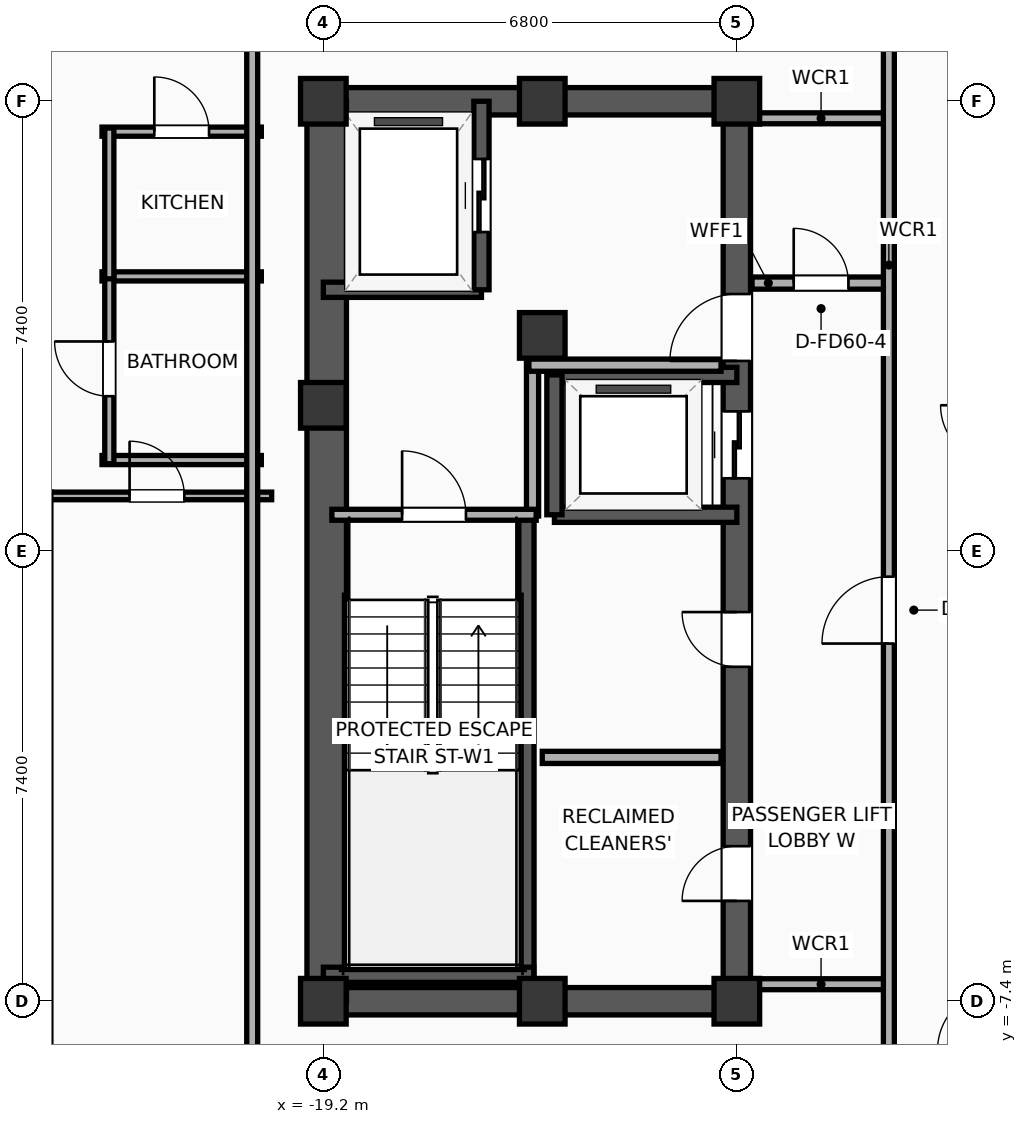
"""IFC4 building model, lengths in metres.
Left out: names, types, materials, properties, quantities, classifications, styles, units other than length and angle.
Written with IfcOpenShell. Run it as: python <this file> out.ifc"""

import sys

from ifc_helpers import new_model, si_unit, direction, frame, frame_2d, origin, origin_2d, place, context, subcontext, project, spatial, rectangle, extrude, element, fill, save


model = new_model("IFC4")
c1 = context("Model", 3, precision=1e-05, world=origin(), true_north=direction((0.0, 1.0)))
c2 = subcontext(c1, "Body", "Model", "MODEL_VIEW")
j1 = project(units=[si_unit("LENGTHUNIT", "METRE"), si_unit("PLANEANGLEUNIT", "RADIAN")], contexts=[c1])
p1 = place(None, origin())
s1 = spatial("IfcSite", under=j1, at=p1, CompositionType="ELEMENT")
p2 = place(p1, origin())
s2 = spatial("IfcBuilding", under=s1, at=p2, CompositionType="ELEMENT")
p3 = place(p2, frame((0.0, 0.0, 287.3)))
s3 = spatial("IfcBuildingStorey", under=s2, at=p3, CompositionType="ELEMENT", Elevation=287.3)
for number, where, z_axis, x_axis in (
    (1, (-19.2, -7.4, 0.0), (0.0, 0.0, 1.0), (1.0, 0.0, 0.0)),
    (2, (-19.2, 2.4, 0.0), (0.0, 0.0, 1.0), (1.0, 0.0, 0.0)),
    (3, (-19.2, 7.4, 0.0), (0.0, 0.0, 1.0), (1.0, 0.0, 0.0)),
    (4, (-15.6, -7.4, 0.0), (0.0, 0.0, 1.0), (1.0, 0.0, 0.0)),
    (5, (-15.6, 7.4, 0.0), (0.0, 0.0, 1.0), (1.0, 0.0, 0.0)),
    (6, (-12.4, -7.4, 0.0), (0.0, 0.0, 1.0), (1.0, 0.0, 0.0)),
    (7, (-15.6, 3.55, 0.0), (0.0, 0.0, 1.0), (1.0, 0.0, 0.0)),
    (8, (-12.4, 7.4, 0.0), (0.0, 0.0, 1.0), (1.0, 0.0, 0.0)),
):
    element("IfcColumn", number, at=place(p3, frame(where, z_axis=z_axis, x_axis=x_axis)), inside=s3, PredefinedType="COLUMN", context=c2, shape_type="SweptSolid", body=[
        extrude(rectangle(XDim=0.75, YDim=0.75, at=origin_2d()), origin(), (0.0, 0.0, 1.0), 3.9),
    ])
for number, where, z_axis, x_axis in (
    (9, (-19.425, -7.4, 0.0), (0.0, 0.0, 1.0), (1.0, 0.0, 0.0)),
    (10, (-19.425, 7.4, 0.0), (0.0, 0.0, 1.0), (1.0, 0.0, 0.0)),
):
    element("IfcWall", number, at=place(p3, frame(where, z_axis=z_axis, x_axis=x_axis)), inside=s3, PredefinedType="SHEAR", context=c2, shape_type="SweptSolid", body=[
        extrude(rectangle(XDim=7.25, YDim=0.45, at=frame_2d((3.625, 0.0))), origin(), (0.0, 0.0, 1.0), 3.635),
    ])
p4 = place(p3, frame((-19.145, -7.4, 0.0), z_axis=(0.0, 0.0, 1.0), x_axis=(0.0, 1.0, 0.0)))
e11 = element("IfcWall", 11, at=p4, inside=s3, PredefinedType="SHEAR", context=c2, shape_type="SweptSolid", body=[
    extrude(rectangle(XDim=14.8, YDim=0.65, at=frame_2d((7.4, 0.0))), origin(), (0.0, 0.0, 1.0), 3.635),
])
p5 = place(p3, frame((-12.4, -7.4, 0.0), z_axis=(0.0, 0.0, 1.0), x_axis=(0.0, 1.0, 0.0)))
e12 = element("IfcWall", 12, at=p5, inside=s3, PredefinedType="SHEAR", context=c2, shape_type="SweptSolid", body=[
    extrude(rectangle(XDim=14.8, YDim=0.45, at=frame_2d((7.4, 0.0))), origin(), (0.0, 0.0, 1.0), 3.635),
])
p6 = place(p5, frame((8.6, 0.0, 0.0)))
e13 = element("IfcOpeningElement", 13, at=p6, cuts=e12, PredefinedType="OPENING", context=c2, shape_type="SweptSolid", body=[
    extrude(rectangle(XDim=1.1, YDim=2.05, at=frame_2d((0.55, 1.025))), frame((0.0, 0.235, 0.0), z_axis=(0.0, -1.0, 0.0), x_axis=(1.0, 0.0, 0.0)), (0.0, 0.0, 1.0), 0.47),
])
p7 = place(p5, frame((10.53, 0.0, 0.0)))
e14 = element("IfcOpeningElement", 14, at=p7, cuts=e12, PredefinedType="OPENING", context=c2, shape_type="SweptSolid", body=[
    extrude(rectangle(XDim=1.1, YDim=2.05, at=frame_2d((0.55, 1.025))), frame((0.0, 0.235, 0.0), z_axis=(0.0, -1.0, 0.0), x_axis=(1.0, 0.0, 0.0)), (0.0, 0.0, 1.0), 0.47),
])
p8 = place(p5, frame((1.65, 0.0, 0.0)))
e15 = element("IfcOpeningElement", 15, at=p8, cuts=e12, PredefinedType="OPENING", context=c2, shape_type="SweptSolid", body=[
    extrude(rectangle(XDim=0.9, YDim=2.05, at=frame_2d((0.45, 1.025))), frame((0.0, 0.235, 0.0), z_axis=(0.0, -1.0, 0.0), x_axis=(1.0, 0.0, 0.0)), (0.0, 0.0, 1.0), 0.47),
])
p9 = place(p5, frame((5.5, 0.0, 0.0)))
e16 = element("IfcOpeningElement", 16, at=p9, cuts=e12, PredefinedType="OPENING", context=c2, shape_type="SweptSolid", body=[
    extrude(rectangle(XDim=0.9, YDim=2.05, at=frame_2d((0.45, 1.025))), frame((0.0, 0.235, 0.0), z_axis=(0.0, -1.0, 0.0), x_axis=(1.0, 0.0, 0.0)), (0.0, 0.0, 1.0), 0.47),
])
p10 = place(p3, frame((-15.86, -7.085, 0.0), z_axis=(0.0, 0.0, 1.0), x_axis=(0.0, 1.0, 0.0)))
e17 = element("IfcWall", 17, at=p10, inside=s3, PredefinedType="SOLIDWALL", context=c2, shape_type="SweptSolid", body=[
    extrude(rectangle(XDim=7.685, YDim=0.25, at=frame_2d((3.843, 0.0))), origin(), (0.0, 0.0, 1.0), 3.635),
])
p11 = place(p3, frame((-19.2, -6.965, 0.0), z_axis=(0.0, 0.0, 1.0), x_axis=(1.0, 0.0, 0.0)))
e18 = element("IfcWall", 18, at=p11, inside=s3, PredefinedType="SOLIDWALL", context=c2, shape_type="SweptSolid", body=[
    extrude(rectangle(XDim=3.46, YDim=0.25, at=frame_2d((1.73, 0.0))), origin(), (0.0, 0.0, 1.0), 3.635),
])
p12 = place(p3, frame((-19.2, 4.3, 0.0), z_axis=(0.0, 0.0, 1.0), x_axis=(1.0, 0.0, 0.0)))
e19 = element("IfcWall", 19, at=p12, inside=s3, PredefinedType="SOLIDWALL", context=c2, shape_type="SweptSolid", body=[
    extrude(rectangle(XDim=2.6, YDim=0.25, at=frame_2d((1.3, 0.0))), origin(), (0.0, 0.0, 1.0), 3.635),
])
p13 = place(p3, frame((-16.6, 4.3, 0.0), z_axis=(0.0, 0.0, 1.0), x_axis=(0.0, 1.0, 0.0)))
e20 = element("IfcWall", 20, at=p13, inside=s3, PredefinedType="SOLIDWALL", context=c2, shape_type="SweptSolid", body=[
    extrude(rectangle(XDim=3.1, YDim=0.25, at=frame_2d((1.55, 0.0))), origin(), (0.0, 0.0, 1.0), 3.635),
])
p14 = place(p13, frame((0.95, 0.0, 0.0)))
e21 = element("IfcOpeningElement", 21, at=p14, cuts=e20, PredefinedType="OPENING", context=c2, shape_type="SweptSolid", body=[
    extrude(rectangle(XDim=1.2, YDim=2.05, at=frame_2d((0.6, 1.025))), frame((0.0, 0.135, 0.0), z_axis=(0.0, -1.0, 0.0), x_axis=(1.0, 0.0, 0.0)), (0.0, 0.0, 1.0), 0.27),
])
for number, where, z_axis, x_axis in (
    (22, (-15.4, 0.6, 0.0), (0.0, 0.0, 1.0), (1.0, 0.0, 0.0)),
    (23, (-12.4, 2.9, 0.0), (0.0, 0.0, 1.0), (-1.0, 0.0, 0.0)),
):
    element("IfcWall", number, at=place(p3, frame(where, z_axis=z_axis, x_axis=x_axis)), inside=s3, PredefinedType="SOLIDWALL", context=c2, shape_type="SweptSolid", body=[
        extrude(rectangle(XDim=3.0, YDim=0.25, at=frame_2d((1.5, 0.0))), origin(), (0.0, 0.0, 1.0), 3.635),
    ])
p15 = place(p3, frame((-15.4, 2.9, 0.0), z_axis=(0.0, 0.0, 1.0), x_axis=(0.0, -1.0, 0.0)))
e24 = element("IfcWall", 24, at=p15, inside=s3, PredefinedType="SOLIDWALL", context=c2, shape_type="SweptSolid", body=[
    extrude(rectangle(XDim=2.3, YDim=0.25, at=frame_2d((1.15, 0.0))), origin(), (0.0, 0.0, 1.0), 3.635),
])
p16 = place(p3, frame((-15.76, 0.58, 0.0), z_axis=(0.0, 0.0, 1.0), x_axis=(0.0, 1.0, 0.0)))
e25 = element("IfcWall", 25, at=p16, inside=s3, PredefinedType="PARTITIONING", context=c2, shape_type="SweptSolid", body=[
    extrude(rectangle(XDim=2.52, YDim=0.2, at=frame_2d((1.26, 0.0))), origin(), (0.0, 0.0, 1.0), 3.635),
])
p17 = place(p3, frame((-15.82, 3.06, 0.0), z_axis=(0.0, 0.0, 1.0), x_axis=(1.0, 0.0, 0.0)))
e26 = element("IfcWall", 26, at=p17, inside=s3, PredefinedType="PARTITIONING", context=c2, shape_type="SweptSolid", body=[
    extrude(rectangle(XDim=3.16, YDim=0.2, at=frame_2d((1.58, 0.0))), origin(), (0.0, 0.0, 1.0), 3.635),
])
p18 = place(p3, frame((-19.06, 0.6, 0.0), z_axis=(0.0, 0.0, 1.0), x_axis=(1.0, 0.0, 0.0)))
e27 = element("IfcWall", 27, at=p18, inside=s3, PredefinedType="PARTITIONING", context=c2, shape_type="SweptSolid", body=[
    extrude(rectangle(XDim=3.36, YDim=0.18, at=frame_2d((1.68, 0.0))), origin(), (0.0, 0.0, 1.0), 3.635),
])
p19 = place(p18, frame((1.155, 0.0, 0.0)))
e28 = element("IfcOpeningElement", 28, at=p19, cuts=e27, PredefinedType="OPENING", context=c2, shape_type="SweptSolid", body=[
    extrude(rectangle(XDim=1.05, YDim=2.05, at=frame_2d((0.525, 1.025))), frame((0.0, 0.1, 0.0), z_axis=(0.0, -1.0, 0.0), x_axis=(1.0, 0.0, 0.0)), (0.0, 0.0, 1.0), 0.2),
])
p20 = place(p3, frame((-15.6, -3.39, 0.0), z_axis=(0.0, 0.0, 1.0), x_axis=(1.0, 0.0, 0.0)))
e29 = element("IfcWall", 29, at=p20, inside=s3, PredefinedType="PARTITIONING", context=c2, shape_type="SweptSolid", body=[
    extrude(rectangle(XDim=2.94, YDim=0.2, at=frame_2d((1.47, 0.0))), origin(), (0.0, 0.0, 1.0), 3.635),
])
p21 = place(p3, frame((-12.15, 4.41, 0.0), z_axis=(0.0, 0.0, 1.0), x_axis=(1.0, 0.0, 0.0)))
e30 = element("IfcWall", 30, at=p21, inside=s3, PredefinedType="PARTITIONING", context=c2, shape_type="SweptSolid", body=[
    extrude(rectangle(XDim=2.27, YDim=0.2, at=frame_2d((1.135, 0.0))), origin(), (0.0, 0.0, 1.0), 3.635),
])
p22 = place(p21, frame((0.685, 0.0, 0.0)))
e31 = element("IfcOpeningElement", 31, at=p22, cuts=e30, PredefinedType="OPENING", context=c2, shape_type="SweptSolid", body=[
    extrude(rectangle(XDim=0.9, YDim=2.05, at=frame_2d((0.45, 1.025))), frame((0.0, 0.11, 0.0), z_axis=(0.0, -1.0, 0.0), x_axis=(1.0, 0.0, 0.0)), (0.0, 0.0, 1.0), 0.22),
])
for number, where, z_axis, x_axis in (
    (32, (-12.15, 7.12, 0.0), (0.0, 0.0, 1.0), (1.0, 0.0, 0.0)),
    (33, (-12.15, -7.12, 0.0), (0.0, 0.0, 1.0), (1.0, 0.0, 0.0)),
):
    element("IfcWall", number, at=place(p3, frame(where, z_axis=z_axis, x_axis=x_axis)), inside=s3, PredefinedType="PARTITIONING", context=c2, shape_type="SweptSolid", body=[
        extrude(rectangle(XDim=2.27, YDim=0.18, at=frame_2d((1.135, 0.0))), origin(), (0.0, 0.0, 1.0), 3.635),
    ])
p23 = place(p3, frame((-9.9, -9.68, 0.0), z_axis=(0.0, 0.0, 1.0), x_axis=(0.0, 1.0, 0.0)))
e34 = element("IfcWall", 34, at=p23, inside=s3, PredefinedType="PARTITIONING", context=c2, shape_type="SweptSolid", body=[
    extrude(rectangle(XDim=19.36, YDim=0.18, at=frame_2d((9.68, 0.0))), origin(), (0.0, 0.0, 1.0), 3.635),
])
p24 = place(p23, frame((8.162, 0.0, 0.0)))
e35 = element("IfcOpeningElement", 35, at=p24, cuts=e34, PredefinedType="OPENING", context=c2, shape_type="SweptSolid", body=[
    extrude(rectangle(XDim=1.1, YDim=2.05, at=frame_2d((0.55, 1.025))), frame((0.0, 0.1, 0.0), z_axis=(0.0, -1.0, 0.0), x_axis=(1.0, 0.0, 0.0)), (0.0, 0.0, 1.0), 0.2),
])
p25 = place(p3, frame((-22.84, 6.9, 0.0), z_axis=(0.0, 0.0, 1.0), x_axis=(1.0, 0.0, 0.0)))
e36 = element("IfcWall", 36, at=p25, inside=s3, PredefinedType="PLUMBINGWALL", context=c2, shape_type="SweptSolid", body=[
    extrude(rectangle(XDim=2.62, YDim=0.15, at=frame_2d((1.31, 0.0))), origin(), (0.0, 0.0, 1.0), 3.635),
])
p26 = place(p25, frame((0.86, 0.0, 0.0)))
e37 = element("IfcOpeningElement", 37, at=p26, cuts=e36, PredefinedType="OPENING", context=c2, shape_type="SweptSolid", body=[
    extrude(rectangle(XDim=0.9, YDim=2.05, at=frame_2d((0.45, 1.025))), frame((0.0, 0.085, 0.0), z_axis=(0.0, -1.0, 0.0), x_axis=(1.0, 0.0, 0.0)), (0.0, 0.0, 1.0), 0.17),
])
for number, where, z_axis, x_axis in (
    (38, (-22.84, 4.52, 0.0), (0.0, 0.0, 1.0), (1.0, 0.0, 0.0)),
    (39, (-22.84, 1.5, 0.0), (0.0, 0.0, 1.0), (1.0, 0.0, 0.0)),
):
    element("IfcWall", number, at=place(p3, frame(where, z_axis=z_axis, x_axis=x_axis)), inside=s3, PredefinedType="PLUMBINGWALL", context=c2, shape_type="SweptSolid", body=[
        extrude(rectangle(XDim=2.62, YDim=0.15, at=frame_2d((1.31, 0.0))), origin(), (0.0, 0.0, 1.0), 3.635),
    ])
p27 = place(p3, frame((-22.72, 1.44, 0.0), z_axis=(0.0, 0.0, 1.0), x_axis=(0.0, 1.0, 0.0)))
e40 = element("IfcWall", 40, at=p27, inside=s3, PredefinedType="PLUMBINGWALL", context=c2, shape_type="SweptSolid", body=[
    extrude(rectangle(XDim=3.12, YDim=0.15, at=frame_2d((1.56, 0.0))), origin(), (0.0, 0.0, 1.0), 3.635),
])
p28 = place(p27, frame((1.11, 0.0, 0.0)))
e41 = element("IfcOpeningElement", 41, at=p28, cuts=e40, PredefinedType="OPENING", context=c2, shape_type="SweptSolid", body=[
    extrude(rectangle(XDim=0.9, YDim=2.05, at=frame_2d((0.45, 1.025))), frame((0.0, 0.085, 0.0), z_axis=(0.0, -1.0, 0.0), x_axis=(1.0, 0.0, 0.0)), (0.0, 0.0, 1.0), 0.17),
])
p29 = place(p3, frame((-22.72, 4.48, 0.0), z_axis=(0.0, 0.0, 1.0), x_axis=(0.0, 1.0, 0.0)))
e42 = element("IfcWall", 42, at=p29, inside=s3, PredefinedType="PLUMBINGWALL", context=c2, shape_type="SweptSolid", body=[
    extrude(rectangle(XDim=2.48, YDim=0.15, at=frame_2d((1.24, 0.0))), origin(), (0.0, 0.0, 1.0), 3.635),
])
p30 = place(p3, frame((-23.805, 0.91, 0.0), z_axis=(0.0, 0.0, 1.0), x_axis=(1.0, 0.0, 0.0)))
e43 = element("IfcWall", 43, at=p30, inside=s3, PredefinedType="PARTITIONING", context=c2, shape_type="SweptSolid", body=[
    extrude(rectangle(XDim=3.755, YDim=0.125, at=frame_2d((1.878, 0.0))), origin(), (0.0, 0.0, 1.0), 3.635),
])
p31 = place(p30, frame((1.419, 0.0, 0.0)))
e44 = element("IfcOpeningElement", 44, at=p31, cuts=e43, PredefinedType="OPENING", context=c2, shape_type="SweptSolid", body=[
    extrude(rectangle(XDim=0.9, YDim=2.05, at=frame_2d((0.45, 1.025))), frame((0.0, 0.073, 0.0), z_axis=(0.0, -1.0, 0.0), x_axis=(1.0, 0.0, 0.0)), (0.0, 0.0, 1.0), 0.145),
])
p32 = place(p3, frame((-20.37, -9.71, 0.0), z_axis=(0.0, 0.0, 1.0), x_axis=(0.0, 1.0, 0.0)))
e45 = element("IfcWall", 45, at=p32, inside=s3, PredefinedType="PARTITIONING", context=c2, shape_type="SweptSolid", body=[
    extrude(rectangle(XDim=19.42, YDim=0.18, at=frame_2d((9.71, 0.0))), origin(), (0.0, 0.0, 1.0), 3.635),
])
p33 = place(p14, origin())
e46 = element("IfcDoor", 46, at=p33, inside=s3, OperationType="SLIDING_TO_LEFT", PredefinedType="DOOR", context=c2, shape_type="SweptSolid", body=[
    extrude(rectangle(XDim=1.2, YDim=2.05, at=frame_2d((0.6, 1.025))), frame((0.0, 0.025, 0.0), z_axis=(0.0, -1.0, 0.0), x_axis=(1.0, 0.0, 0.0)), (0.0, 0.0, 1.0), 0.05),
])
fill(e21, e46)
p34 = place(p6, origin())
e47 = element("IfcDoor", 47, at=p34, inside=s3, OperationType="SLIDING_TO_LEFT", PredefinedType="DOOR", context=c2, shape_type="SweptSolid", body=[
    extrude(rectangle(XDim=1.1, YDim=2.05, at=frame_2d((0.55, 1.025))), frame((0.0, 0.025, 0.0), z_axis=(0.0, -1.0, 0.0), x_axis=(1.0, 0.0, 0.0)), (0.0, 0.0, 1.0), 0.05),
])
fill(e13, e47)
p35 = place(p19, origin())
e48 = element("IfcDoor", 48, at=p35, inside=s3, OperationType="SINGLE_SWING_LEFT", PredefinedType="DOOR", context=c2, shape_type="SweptSolid", body=[
    extrude(rectangle(XDim=1.05, YDim=2.05, at=frame_2d((0.525, 1.025))), frame((0.0, 0.025, 0.0), z_axis=(0.0, -1.0, 0.0), x_axis=(1.0, 0.0, 0.0)), (0.0, 0.0, 1.0), 0.05),
])
fill(e28, e48)
p36 = place(p22, origin())
e49 = element("IfcDoor", 49, at=p36, inside=s3, OperationType="SINGLE_SWING_LEFT", PredefinedType="DOOR", context=c2, shape_type="SweptSolid", body=[
    extrude(rectangle(XDim=0.9, YDim=2.05, at=frame_2d((0.45, 1.025))), frame((0.0, 0.025, 0.0), z_axis=(0.0, -1.0, 0.0), x_axis=(1.0, 0.0, 0.0)), (0.0, 0.0, 1.0), 0.05),
])
fill(e31, e49)
p37 = place(p24, origin())
e50 = element("IfcDoor", 50, at=p37, inside=s3, OperationType="SINGLE_SWING_LEFT", PredefinedType="DOOR", context=c2, shape_type="SweptSolid", body=[
    extrude(rectangle(XDim=1.1, YDim=2.05, at=frame_2d((0.55, 1.025))), frame((0.0, 0.025, 0.0), z_axis=(0.0, -1.0, 0.0), x_axis=(1.0, 0.0, 0.0)), (0.0, 0.0, 1.0), 0.05),
])
fill(e35, e50)
p38 = place(p26, origin())
e51 = element("IfcDoor", 51, at=p38, inside=s3, OperationType="SINGLE_SWING_LEFT", PredefinedType="DOOR", context=c2, shape_type="SweptSolid", body=[
    extrude(rectangle(XDim=0.9, YDim=2.05, at=frame_2d((0.45, 1.025))), frame((0.0, 0.025, 0.0), z_axis=(0.0, -1.0, 0.0), x_axis=(1.0, 0.0, 0.0)), (0.0, 0.0, 1.0), 0.05),
])
fill(e37, e51)
p39 = place(p28, origin())
e52 = element("IfcDoor", 52, at=p39, inside=s3, OperationType="SINGLE_SWING_RIGHT", PredefinedType="DOOR", context=c2, shape_type="SweptSolid", body=[
    extrude(rectangle(XDim=0.9, YDim=2.05, at=frame_2d((0.45, 1.025))), frame((0.0, 0.025, 0.0), z_axis=(0.0, -1.0, 0.0), x_axis=(1.0, 0.0, 0.0)), (0.0, 0.0, 1.0), 0.05),
])
fill(e41, e52)
p40 = place(p31, origin())
e53 = element("IfcDoor", 53, at=p40, inside=s3, OperationType="SINGLE_SWING_LEFT", PredefinedType="DOOR", context=c2, shape_type="SweptSolid", body=[
    extrude(rectangle(XDim=0.9, YDim=2.05, at=frame_2d((0.45, 1.025))), frame((0.0, 0.025, 0.0), z_axis=(0.0, -1.0, 0.0), x_axis=(1.0, 0.0, 0.0)), (0.0, 0.0, 1.0), 0.05),
])
fill(e44, e53)
p41 = place(p7, origin())
e54 = element("IfcDoor", 54, at=p41, inside=s3, OperationType="SINGLE_SWING_LEFT", PredefinedType="DOOR", context=c2, shape_type="SweptSolid", body=[
    extrude(rectangle(XDim=1.1, YDim=2.05, at=frame_2d((0.55, 1.025))), frame((0.0, 0.025, 0.0), z_axis=(0.0, -1.0, 0.0), x_axis=(1.0, 0.0, 0.0)), (0.0, 0.0, 1.0), 0.05),
])
fill(e14, e54)
p42 = place(p8, origin())
e55 = element("IfcDoor", 55, at=p42, inside=s3, OperationType="SINGLE_SWING_LEFT", PredefinedType="DOOR", context=c2, shape_type="SweptSolid", body=[
    extrude(rectangle(XDim=0.9, YDim=2.05, at=frame_2d((0.45, 1.025))), frame((0.0, 0.025, 0.0), z_axis=(0.0, -1.0, 0.0), x_axis=(1.0, 0.0, 0.0)), (0.0, 0.0, 1.0), 0.05),
])
fill(e15, e55)
p43 = place(p9, origin())
e56 = element("IfcDoor", 56, at=p43, inside=s3, OperationType="SINGLE_SWING_RIGHT", PredefinedType="DOOR", context=c2, shape_type="SweptSolid", body=[
    extrude(rectangle(XDim=0.9, YDim=2.05, at=frame_2d((0.45, 1.025))), frame((0.0, 0.025, 0.0), z_axis=(0.0, -1.0, 0.0), x_axis=(1.0, 0.0, 0.0)), (0.0, 0.0, 1.0), 0.05),
])
fill(e16, e56)
save(model, sys.argv[1])
